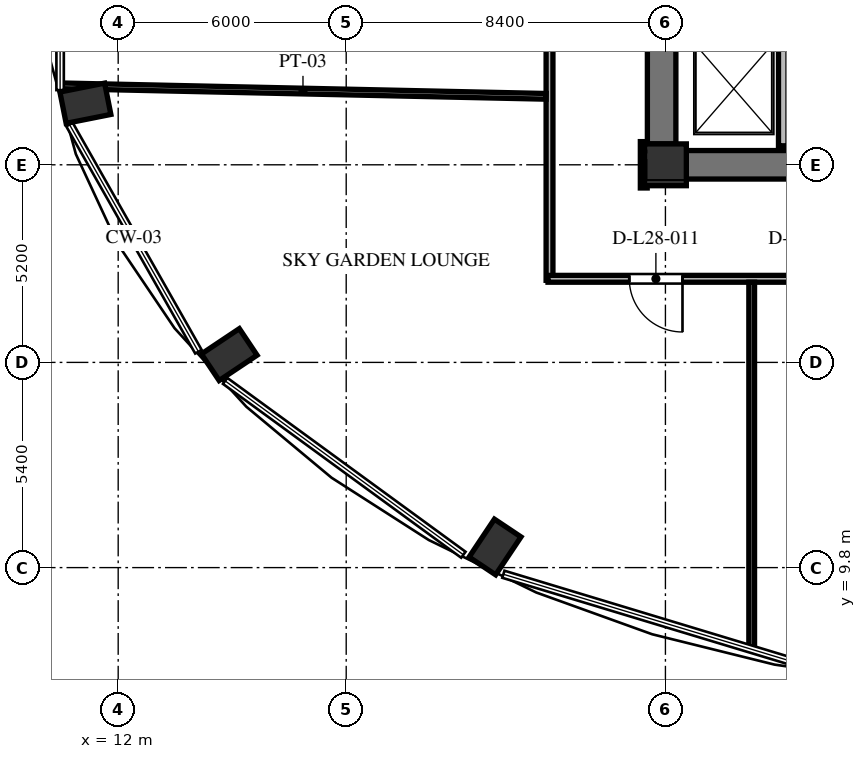
"""IFC4 building model, lengths in metres.
Left out: names, types, materials, properties, quantities, classifications, styles, units other than length and angle.
Written with IfcOpenShell. Run it as: python <this file> out.ifc"""

import sys

from ifc_helpers import new_model, si_unit, direction, frame, frame_2d, origin, origin_2d, place, context, subcontext, project, spatial, rectangle, extrude, element, fill, save


model = new_model("IFC4")
c1 = context("Model", 3, precision=1e-05, world=origin(), true_north=direction((0.0, 1.0)))
c2 = subcontext(c1, "Body", "Model", "MODEL_VIEW")
j1 = project(units=[si_unit("LENGTHUNIT", "METRE"), si_unit("PLANEANGLEUNIT", "RADIAN")], contexts=[c1])
p1 = place(None, origin())
s1 = spatial("IfcSite", under=j1, at=p1, CompositionType="ELEMENT")
p2 = place(p1, origin())
s2 = spatial("IfcBuilding", under=s1, at=p2, CompositionType="ELEMENT")
p3 = place(p2, frame((0.0, 0.0, 110.928)))
s3 = spatial("IfcBuildingStorey", under=s2, at=p3, CompositionType="ELEMENT", Elevation=110.928)
for number, where, z_axis, x_axis in (
    (1, (11.137, 22.02, 0.0), (0.0, 0.0, 1.0), (-0.981, -0.195, 0.0)),
    (2, (14.922, 15.405, 0.0), (0.0, 0.0, 1.0), (-0.831, -0.556, 0.0)),
    (3, (21.916, 10.343, 0.0), (0.0, 0.0, 1.0), (-0.556, -0.831, 0.0)),
):
    element("IfcColumn", number, at=place(p3, frame(where, z_axis=z_axis, x_axis=x_axis)), inside=s3, PredefinedType="COLUMN", context=c2, shape_type="SweptSolid", body=[
        extrude(rectangle(XDim=1.2, YDim=0.84, at=origin_2d()), origin(), (0.0, 0.0, 1.0), 3.648),
    ])
p4 = place(p3, frame((26.4, 20.4, 0.0), z_axis=(0.0, 0.0, 1.0), x_axis=(1.0, 0.0, 0.0)))
e4 = element("IfcColumn", 4, at=p4, inside=s3, PredefinedType="COLUMN", context=c2, shape_type="SweptSolid", body=[
    extrude(rectangle(XDim=1.1, YDim=1.1, at=origin_2d()), origin(), (0.0, 0.0, 1.0), 3.648),
])
p5 = place(p3, frame((26.3, 20.95, 0.0), z_axis=(0.0, 0.0, 1.0), x_axis=(0.0, 1.0, 0.0)))
e5 = element("IfcWall", 5, at=p5, inside=s3, PredefinedType="SHEAR", context=c2, shape_type="SweptSolid", body=[
    extrude(rectangle(XDim=14.1, YDim=0.75, at=frame_2d((7.05, 0.0))), origin(), (0.0, 0.0, 1.0), 3.648),
])
p6 = place(p5, frame((6.5, 0.0, 0.0)))
e6 = element("IfcOpeningElement", 6, at=p6, cuts=e5, PredefinedType="OPENING", context=c2, shape_type="SweptSolid", body=[
    extrude(rectangle(XDim=1.2, YDim=2.15, at=frame_2d((0.6, 1.075))), frame((0.0, 0.385, 0.0), z_axis=(0.0, -1.0, 0.0), x_axis=(1.0, 0.0, 0.0)), (0.0, 0.0, 1.0), 0.77),
])
p7 = place(p5, frame((9.6, 0.0, 0.0)))
e7 = element("IfcOpeningElement", 7, at=p7, cuts=e5, PredefinedType="OPENING", context=c2, shape_type="SweptSolid", body=[
    extrude(rectangle(XDim=1.3, YDim=2.2, at=frame_2d((0.65, 1.1))), frame((0.0, 0.385, 0.0), z_axis=(0.0, -1.0, 0.0), x_axis=(1.0, 0.0, 0.0)), (0.0, 0.0, 1.0), 0.77),
])
p8 = place(p5, frame((3.26, 0.0, 0.0)))
e8 = element("IfcOpeningElement", 8, at=p8, cuts=e5, PredefinedType="OPENING", context=c2, shape_type="SweptSolid", body=[
    extrude(rectangle(XDim=1.3, YDim=2.2, at=frame_2d((0.65, 1.1))), frame((0.0, 0.385, 0.0), z_axis=(0.0, -1.0, 0.0), x_axis=(1.0, 0.0, 0.0)), (0.0, 0.0, 1.0), 0.77),
])
p9 = place(p3, frame((26.95, 20.4, 0.0), z_axis=(0.0, 0.0, 1.0), x_axis=(1.0, 0.0, 0.0)))
e9 = element("IfcWall", 9, at=p9, inside=s3, PredefinedType="SHEAR", context=c2, shape_type="SweptSolid", body=[
    extrude(rectangle(XDim=5.375, YDim=0.75, at=frame_2d((2.688, 0.0))), origin(), (0.0, 0.0, 1.0), 3.648),
])
p10 = place(p3, frame((29.5, 20.9, 0.0), z_axis=(0.0, 0.0, 1.0), x_axis=(0.0, 1.0, 0.0)))
e10 = element("IfcWall", 10, at=p10, inside=s3, PredefinedType="SOLIDWALL", context=c2, shape_type="SweptSolid", body=[
    extrude(rectangle(XDim=2.8, YDim=0.25, at=frame_2d((1.4, 0.0))), origin(), (0.0, 0.0, 1.0), 3.428),
])
p11 = place(p3, frame((23.35, 17.36, 0.0), z_axis=(0.0, 0.0, 1.0), x_axis=(0.0, 1.0, 0.0)))
e11 = element("IfcWall", 11, at=p11, inside=s3, PredefinedType="PARTITIONING", context=c2, shape_type="SweptSolid", body=[
    extrude(rectangle(XDim=18.505, YDim=0.18, at=frame_2d((9.252, 0.0))), origin(), (0.0, 0.0, 1.0), 3.428),
])
p12 = place(p11, frame((10.814, 0.0, 0.0)))
e12 = element("IfcOpeningElement", 12, at=p12, cuts=e11, PredefinedType="OPENING", context=c2, shape_type="SweptSolid", body=[
    extrude(rectangle(XDim=1.4, YDim=2.2, at=frame_2d((0.7, 1.1))), frame((0.0, 0.1, 0.0), z_axis=(0.0, -1.0, 0.0), x_axis=(1.0, 0.0, 0.0)), (0.0, 0.0, 1.0), 0.2),
])
p13 = place(p3, frame((25.83, 21.01, 0.0), z_axis=(0.0, 0.0, 1.0), x_axis=(0.0, -1.0, 0.0)))
e13 = element("IfcWall", 13, at=p13, inside=s3, PredefinedType="PARTITIONING", context=c2, shape_type="SweptSolid", body=[
    extrude(rectangle(XDim=1.22, YDim=0.18, at=frame_2d((0.61, 0.0))), origin(), (0.0, 0.0, 1.0), 3.428),
])
p14 = place(p3, frame((45.24, 17.4, 0.0), z_axis=(0.0, 0.0, 1.0), x_axis=(-1.0, 0.0, 0.0)))
e14 = element("IfcWall", 14, at=p14, inside=s3, PredefinedType="PARTITIONING", context=c2, shape_type="SweptSolid", body=[
    extrude(rectangle(XDim=21.93, YDim=0.18, at=frame_2d((10.965, 0.0))), origin(), (0.0, 0.0, 1.0), 3.053),
])
p15 = place(p14, frame((18.391, 0.0, 0.0)))
e15 = element("IfcOpeningElement", 15, at=p15, cuts=e14, PredefinedType="OPENING", context=c2, shape_type="SweptSolid", body=[
    extrude(rectangle(XDim=1.4, YDim=2.2, at=frame_2d((0.7, 1.1))), frame((0.0, 0.1, 0.0), z_axis=(0.0, -1.0, 0.0), x_axis=(1.0, 0.0, 0.0)), (0.0, 0.0, 1.0), 0.2),
])
p16 = place(p14, frame((14.465, 0.0, 0.0)))
e16 = element("IfcOpeningElement", 16, at=p16, cuts=e14, PredefinedType="OPENING", context=c2, shape_type="SweptSolid", body=[
    extrude(rectangle(XDim=1.05, YDim=2.15, at=frame_2d((0.525, 1.075))), frame((0.0, 0.1, 0.0), z_axis=(0.0, -1.0, 0.0), x_axis=(1.0, 0.0, 0.0)), (0.0, 0.0, 1.0), 0.2),
])
p17 = place(p14, frame((9.515, 0.0, 0.0)))
e17 = element("IfcOpeningElement", 17, at=p17, cuts=e14, PredefinedType="OPENING", context=c2, shape_type="SweptSolid", body=[
    extrude(rectangle(XDim=1.05, YDim=2.15, at=frame_2d((0.525, 1.075))), frame((0.0, 0.1, 0.0), z_axis=(0.0, -1.0, 0.0), x_axis=(1.0, 0.0, 0.0)), (0.0, 0.0, 1.0), 0.2),
])
p18 = place(p14, frame((4.961, 0.0, 0.0)))
e18 = element("IfcOpeningElement", 18, at=p18, cuts=e14, PredefinedType="OPENING", context=c2, shape_type="SweptSolid", body=[
    extrude(rectangle(XDim=1.05, YDim=2.15, at=frame_2d((0.525, 1.075))), frame((0.0, 0.1, 0.0), z_axis=(0.0, -1.0, 0.0), x_axis=(1.0, 0.0, 0.0)), (0.0, 0.0, 1.0), 0.2),
])
p19 = place(p14, frame((1.41, 0.0, 0.0)))
e19 = element("IfcOpeningElement", 19, at=p19, cuts=e14, PredefinedType="OPENING", context=c2, shape_type="SweptSolid", body=[
    extrude(rectangle(XDim=1.4, YDim=2.2, at=frame_2d((0.7, 1.1))), frame((0.0, 0.1, 0.0), z_axis=(0.0, -1.0, 0.0), x_axis=(1.0, 0.0, 0.0)), (0.0, 0.0, 1.0), 0.2),
])
p20 = place(p3, frame((10.465, 22.479, 0.0), z_axis=(0.0, 0.0, 1.0), x_axis=(0.999765147572, -0.021671402821, 0.0)))
e20 = element("IfcWall", 20, at=p20, inside=s3, PredefinedType="PARTITIONING", context=c2, shape_type="SweptSolid", body=[
    extrude(rectangle(XDim=12.798, YDim=0.15, at=frame_2d((6.399, 0.0))), origin(), (0.0, 0.0, 1.0), 3.428),
])
p21 = place(p3, frame((28.67, 7.664, 0.0), z_axis=(0.0, 0.0, 1.0), x_axis=(0.0, 1.0, 0.0)))
e21 = element("IfcWall", 21, at=p21, inside=s3, PredefinedType="PARTITIONING", context=c2, shape_type="SweptSolid", body=[
    extrude(rectangle(XDim=9.646, YDim=0.15, at=frame_2d((4.823, 0.0))), origin(), (0.0, 0.0, 1.0), 3.428),
])
p22 = place(p15, origin())
e22 = element("IfcDoor", 22, at=p22, inside=s3, OperationType="SINGLE_SWING_LEFT", PredefinedType="DOOR", context=c2, shape_type="SweptSolid", body=[
    extrude(rectangle(XDim=1.4, YDim=2.2, at=frame_2d((0.7, 1.1))), frame((0.0, 0.025, 0.0), z_axis=(0.0, -1.0, 0.0), x_axis=(1.0, 0.0, 0.0)), (0.0, 0.0, 1.0), 0.05),
])
fill(e15, e22)
save(model, sys.argv[1])
